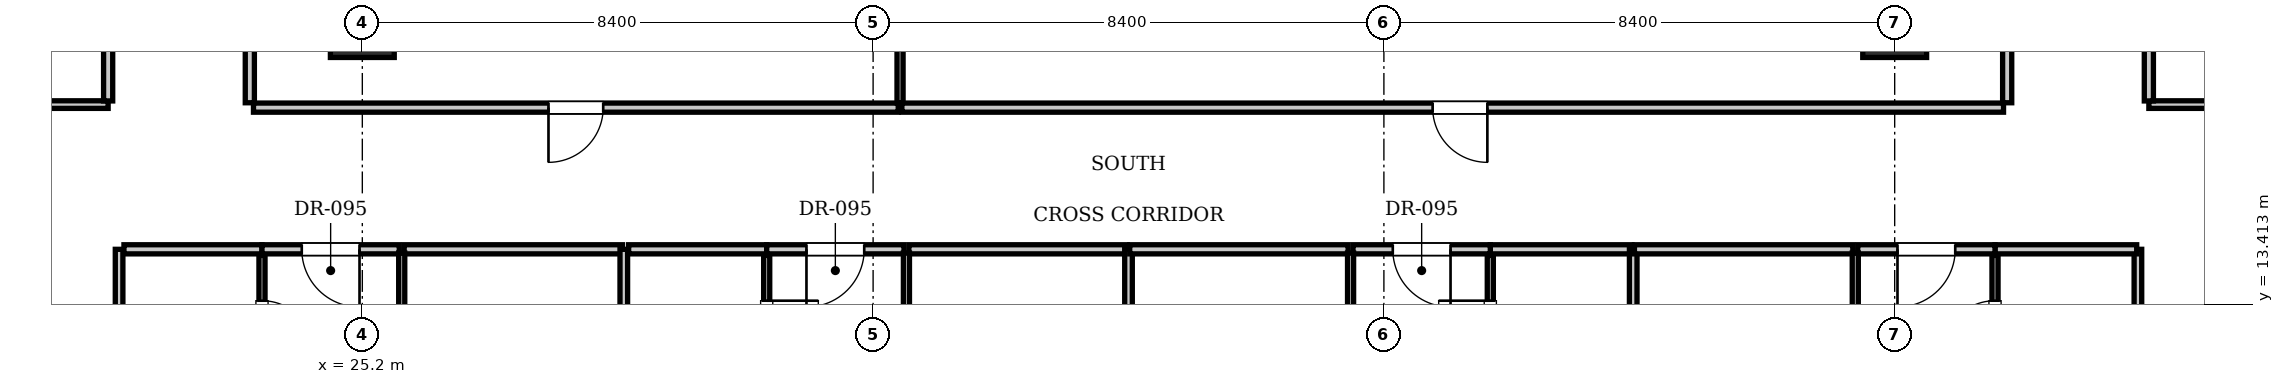
"""IFC4 building model, lengths in metres.
Left out: names, types, materials, properties, quantities, classifications, styles, units other than length and angle.
Written with IfcOpenShell. Run it as: python <this file> out.ifc"""

import sys

from ifc_helpers import new_model, si_unit, direction, frame, frame_2d, origin, origin_2d, place, context, subcontext, project, spatial, rectangle, extrude, element, fill, save


model = new_model("IFC4")
c1 = context("Model", 3, precision=1e-05, world=origin(), true_north=direction((0.0, 1.0)))
c2 = subcontext(c1, "Body", "Model", "MODEL_VIEW")
j1 = project(units=[si_unit("LENGTHUNIT", "METRE"), si_unit("PLANEANGLEUNIT", "RADIAN")], contexts=[c1])
p1 = place(None, origin())
s1 = spatial("IfcSite", under=j1, at=p1, CompositionType="ELEMENT")
p2 = place(p1, origin())
s2 = spatial("IfcBuilding", under=s1, at=p2, CompositionType="ELEMENT")
p3 = place(p2, frame((0.0, 0.0, 46.2)))
s3 = spatial("IfcBuildingStorey", under=s2, at=p3, CompositionType="ELEMENT", Elevation=46.2)
for number, where, z_axis, x_axis in (
    (1, (25.2, 18.0, 0.0), (0.0, 0.0, 1.0), (1.0, 0.0, 0.0)),
    (2, (50.4, 18.0, 0.0), (0.0, 0.0, 1.0), (1.0, 0.0, 0.0)),
):
    element("IfcColumn", number, at=place(p3, frame(where, z_axis=z_axis, x_axis=x_axis)), inside=s3, PredefinedType="COLUMN", context=c2, shape_type="SweptSolid", body=[
        extrude(rectangle(XDim=1.05, YDim=1.05, at=origin_2d()), origin(), (0.0, 0.0, 1.0), 3.85),
    ])
for number, where, z_axis, x_axis in (
    (3, (23.35, 16.73, 0.0), (0.0, 0.0, 1.0), (0.0, 1.0, 0.0)),
    (4, (52.25, 16.73, 0.0), (0.0, 0.0, 1.0), (0.0, 1.0, 0.0)),
):
    element("IfcWall", number, at=place(p3, frame(where, z_axis=z_axis, x_axis=x_axis)), inside=s3, PredefinedType="PARTITIONING", context=c2, shape_type="SweptSolid", body=[
        extrude(rectangle(XDim=7.53, YDim=0.15, at=frame_2d((3.765, 0.0))), origin(), (0.0, 0.0, 1.0), 3.61),
    ])
p4 = place(p3, frame((23.41, 16.65, 0.0), z_axis=(0.0, 0.0, 1.0), x_axis=(1.0, 0.0, 0.0)))
e5 = element("IfcWall", 5, at=p4, inside=s3, PredefinedType="PARTITIONING", context=c2, shape_type="SweptSolid", body=[
    extrude(rectangle(XDim=10.603, YDim=0.15, at=frame_2d((5.302, 0.0))), origin(), (0.0, 0.0, 1.0), 3.61),
])
p5 = place(p4, frame((4.852, 0.0, 0.0)))
e6 = element("IfcOpeningElement", 6, at=p5, cuts=e5, PredefinedType="OPENING", context=c2, shape_type="SweptSolid", body=[
    extrude(rectangle(XDim=0.9, YDim=2.1, at=frame_2d((0.45, 1.05))), frame((0.0, 0.085, 0.0), z_axis=(0.0, -1.0, 0.0), x_axis=(1.0, 0.0, 0.0)), (0.0, 0.0, 1.0), 0.17),
])
p6 = place(p3, frame((34.043, 16.73, 0.0), z_axis=(0.0, 0.0, 1.0), x_axis=(0.0, 1.0, 0.0)))
e7 = element("IfcWall", 7, at=p6, inside=s3, PredefinedType="PARTITIONING", context=c2, shape_type="SweptSolid", body=[
    extrude(rectangle(XDim=7.53, YDim=0.1, at=frame_2d((3.765, 0.0))), origin(), (0.0, 0.0, 1.0), 3.61),
])
p7 = place(p3, frame((34.073, 16.65, 0.0), z_axis=(0.0, 0.0, 1.0), x_axis=(1.0, 0.0, 0.0)))
e8 = element("IfcWall", 8, at=p7, inside=s3, PredefinedType="PARTITIONING", context=c2, shape_type="SweptSolid", body=[
    extrude(rectangle(XDim=18.117, YDim=0.15, at=frame_2d((9.059, 0.0))), origin(), (0.0, 0.0, 1.0), 3.61),
])
p8 = place(p7, frame((8.729, 0.0, 0.0)))
e9 = element("IfcOpeningElement", 9, at=p8, cuts=e8, PredefinedType="OPENING", context=c2, shape_type="SweptSolid", body=[
    extrude(rectangle(XDim=0.9, YDim=2.1, at=frame_2d((0.45, 1.05))), frame((0.0, 0.085, 0.0), z_axis=(0.0, -1.0, 0.0), x_axis=(1.0, 0.0, 0.0)), (0.0, 0.0, 1.0), 0.17),
])
for number, where, z_axis, x_axis in (
    (10, (21.2, 0.1, 0.0), (0.0, 0.0, 1.0), (0.0, 1.0, 0.0)),
    (11, (54.4, 0.1, 0.0), (0.0, 0.0, 1.0), (0.0, 1.0, 0.0)),
):
    element("IfcWall", number, at=place(p3, frame(where, z_axis=z_axis, x_axis=x_axis)), inside=s3, PredefinedType="PARTITIONING", context=c2, shape_type="SweptSolid", body=[
        extrude(rectangle(XDim=14.22, YDim=0.125, at=frame_2d((7.11, 0.0))), origin(), (0.0, 0.0, 1.0), 3.61),
    ])
p9 = place(p3, frame((21.28, 14.32, 0.0), z_axis=(0.0, 0.0, 1.0), x_axis=(1.0, 0.0, 0.0)))
e12 = element("IfcWall", 12, at=p9, inside=s3, PredefinedType="PARTITIONING", context=c2, shape_type="SweptSolid", body=[
    extrude(rectangle(XDim=2.27, YDim=0.15, at=frame_2d((1.135, 0.0))), origin(), (0.0, 0.0, 1.0), 3.61),
])
p10 = place(p3, frame((23.55, 11.88, 0.0), z_axis=(0.0, 0.0, 1.0), x_axis=(0.0, 1.0, 0.0)))
e13 = element("IfcWall", 13, at=p10, inside=s3, PredefinedType="PARTITIONING", context=c2, shape_type="SweptSolid", body=[
    extrude(rectangle(XDim=2.34, YDim=0.1, at=frame_2d((1.17, 0.0))), origin(), (0.0, 0.0, 1.0), 3.61),
])
p11 = place(p10, frame((0.745, 0.0, 0.0)))
e14 = element("IfcOpeningElement", 14, at=p11, cuts=e13, PredefinedType="OPENING", context=c2, shape_type="SweptSolid", body=[
    extrude(rectangle(XDim=0.85, YDim=2.1, at=frame_2d((0.425, 1.05))), frame((0.0, 0.06, 0.0), z_axis=(0.0, -1.0, 0.0), x_axis=(1.0, 0.0, 0.0)), (0.0, 0.0, 1.0), 0.12),
])
p12 = place(p3, frame((23.55, 14.32, 0.0), z_axis=(0.0, 0.0, 1.0), x_axis=(1.0, 0.0, 0.0)))
e15 = element("IfcWall", 15, at=p12, inside=s3, PredefinedType="PARTITIONING", context=c2, shape_type="SweptSolid", body=[
    extrude(rectangle(XDim=2.258, YDim=0.15, at=frame_2d((1.129, 0.0))), origin(), (0.0, 0.0, 1.0), 3.61),
])
p13 = place(p12, frame((0.654, 0.0, 0.0)))
e16 = element("IfcOpeningElement", 16, at=p13, cuts=e15, PredefinedType="OPENING", context=c2, shape_type="SweptSolid", body=[
    extrude(rectangle(XDim=0.95, YDim=2.15, at=frame_2d((0.475, 1.075))), frame((0.0, 0.085, 0.0), z_axis=(0.0, -1.0, 0.0), x_axis=(1.0, 0.0, 0.0)), (0.0, 0.0, 1.0), 0.17),
])
p14 = place(p3, frame((25.888, 14.32, 0.0), z_axis=(0.0, 0.0, 1.0), x_axis=(1.0, 0.0, 0.0)))
e17 = element("IfcWall", 17, at=p14, inside=s3, PredefinedType="PARTITIONING", context=c2, shape_type="SweptSolid", body=[
    extrude(rectangle(XDim=3.592, YDim=0.15, at=frame_2d((1.796, 0.0))), origin(), (0.0, 0.0, 1.0), 3.61),
])
p15 = place(p3, frame((25.848, 0.03, 0.0), z_axis=(0.0, 0.0, 1.0), x_axis=(0.0, 1.0, 0.0)))
e18 = element("IfcWall", 18, at=p15, inside=s3, PredefinedType="PARTITIONING", context=c2, shape_type="SweptSolid", body=[
    extrude(rectangle(XDim=14.23, YDim=0.1, at=frame_2d((7.115, 0.0))), origin(), (0.0, 0.0, 1.0), 3.61),
])
p16 = place(p15, frame((1.6, 0.0, 0.0)))
e19 = element("IfcOpeningElement", 19, at=p16, cuts=e18, PredefinedType="OPENING", context=c2, shape_type="SweptSolid", body=[
    extrude(rectangle(XDim=0.9, YDim=2.1, at=frame_2d((0.45, 1.05))), frame((0.0, 0.06, 0.0), z_axis=(0.0, -1.0, 0.0), x_axis=(1.0, 0.0, 0.0)), (0.0, 0.0, 1.0), 0.12),
])
p17 = place(p3, frame((29.5, 0.1, 0.0), z_axis=(0.0, 0.0, 1.0), x_axis=(0.0, 1.0, 0.0)))
e20 = element("IfcWall", 20, at=p17, inside=s3, PredefinedType="PARTITIONING", context=c2, shape_type="SweptSolid", body=[
    extrude(rectangle(XDim=14.22, YDim=0.125, at=frame_2d((7.11, 0.0))), origin(), (0.0, 0.0, 1.0), 3.255),
])
p18 = place(p3, frame((29.58, 14.32, 0.0), z_axis=(0.0, 0.0, 1.0), x_axis=(1.0, 0.0, 0.0)))
e21 = element("IfcWall", 21, at=p18, inside=s3, PredefinedType="PARTITIONING", context=c2, shape_type="SweptSolid", body=[
    extrude(rectangle(XDim=2.27, YDim=0.15, at=frame_2d((1.135, 0.0))), origin(), (0.0, 0.0, 1.0), 3.61),
])
p19 = place(p3, frame((31.85, 11.88, 0.0), z_axis=(0.0, 0.0, 1.0), x_axis=(0.0, 1.0, 0.0)))
e22 = element("IfcWall", 22, at=p19, inside=s3, PredefinedType="PARTITIONING", context=c2, shape_type="SweptSolid", body=[
    extrude(rectangle(XDim=2.34, YDim=0.1, at=frame_2d((1.17, 0.0))), origin(), (0.0, 0.0, 1.0), 3.61),
])
p20 = place(p19, frame((0.745, 0.0, 0.0)))
e23 = element("IfcOpeningElement", 23, at=p20, cuts=e22, PredefinedType="OPENING", context=c2, shape_type="SweptSolid", body=[
    extrude(rectangle(XDim=0.85, YDim=2.1, at=frame_2d((0.425, 1.05))), frame((0.0, 0.06, 0.0), z_axis=(0.0, -1.0, 0.0), x_axis=(1.0, 0.0, 0.0)), (0.0, 0.0, 1.0), 0.12),
])
p21 = place(p3, frame((31.85, 14.32, 0.0), z_axis=(0.0, 0.0, 1.0), x_axis=(1.0, 0.0, 0.0)))
e24 = element("IfcWall", 24, at=p21, inside=s3, PredefinedType="PARTITIONING", context=c2, shape_type="SweptSolid", body=[
    extrude(rectangle(XDim=2.258, YDim=0.15, at=frame_2d((1.129, 0.0))), origin(), (0.0, 0.0, 1.0), 3.61),
])
p22 = place(p21, frame((0.654, 0.0, 0.0)))
e25 = element("IfcOpeningElement", 25, at=p22, cuts=e24, PredefinedType="OPENING", context=c2, shape_type="SweptSolid", body=[
    extrude(rectangle(XDim=0.95, YDim=2.15, at=frame_2d((0.475, 1.075))), frame((0.0, 0.085, 0.0), z_axis=(0.0, -1.0, 0.0), x_axis=(1.0, 0.0, 0.0)), (0.0, 0.0, 1.0), 0.17),
])
p23 = place(p3, frame((34.188, 14.32, 0.0), z_axis=(0.0, 0.0, 1.0), x_axis=(1.0, 0.0, 0.0)))
e26 = element("IfcWall", 26, at=p23, inside=s3, PredefinedType="PARTITIONING", context=c2, shape_type="SweptSolid", body=[
    extrude(rectangle(XDim=3.592, YDim=0.15, at=frame_2d((1.796, 0.0))), origin(), (0.0, 0.0, 1.0), 3.61),
])
p24 = place(p3, frame((34.148, 0.03, 0.0), z_axis=(0.0, 0.0, 1.0), x_axis=(0.0, 1.0, 0.0)))
e27 = element("IfcWall", 27, at=p24, inside=s3, PredefinedType="PARTITIONING", context=c2, shape_type="SweptSolid", body=[
    extrude(rectangle(XDim=14.23, YDim=0.1, at=frame_2d((7.115, 0.0))), origin(), (0.0, 0.0, 1.0), 3.61),
])
p25 = place(p24, frame((1.6, 0.0, 0.0)))
e28 = element("IfcOpeningElement", 28, at=p25, cuts=e27, PredefinedType="OPENING", context=c2, shape_type="SweptSolid", body=[
    extrude(rectangle(XDim=0.9, YDim=2.1, at=frame_2d((0.45, 1.05))), frame((0.0, 0.06, 0.0), z_axis=(0.0, -1.0, 0.0), x_axis=(1.0, 0.0, 0.0)), (0.0, 0.0, 1.0), 0.12),
])
p26 = place(p3, frame((37.8, 0.1, 0.0), z_axis=(0.0, 0.0, 1.0), x_axis=(0.0, 1.0, 0.0)))
e29 = element("IfcWall", 29, at=p26, inside=s3, PredefinedType="PARTITIONING", context=c2, shape_type="SweptSolid", body=[
    extrude(rectangle(XDim=14.22, YDim=0.125, at=frame_2d((7.11, 0.0))), origin(), (0.0, 0.0, 1.0), 3.293),
])
p27 = place(p3, frame((43.75, 14.32, 0.0), z_axis=(0.0, 0.0, 1.0), x_axis=(1.0, 0.0, 0.0)))
e30 = element("IfcWall", 30, at=p27, inside=s3, PredefinedType="PARTITIONING", context=c2, shape_type="SweptSolid", body=[
    extrude(rectangle(XDim=2.33, YDim=0.15, at=frame_2d((1.165, 0.0))), origin(), (0.0, 0.0, 1.0), 3.61),
])
p28 = place(p3, frame((43.75, 11.88, 0.0), z_axis=(0.0, 0.0, 1.0), x_axis=(0.0, 1.0, 0.0)))
e31 = element("IfcWall", 31, at=p28, inside=s3, PredefinedType="PARTITIONING", context=c2, shape_type="SweptSolid", body=[
    extrude(rectangle(XDim=2.34, YDim=0.1, at=frame_2d((1.17, 0.0))), origin(), (0.0, 0.0, 1.0), 3.61),
])
p29 = place(p28, frame((0.745, 0.0, 0.0)))
e32 = element("IfcOpeningElement", 32, at=p29, cuts=e31, PredefinedType="OPENING", context=c2, shape_type="SweptSolid", body=[
    extrude(rectangle(XDim=0.85, YDim=2.1, at=frame_2d((0.425, 1.05))), frame((0.0, 0.06, 0.0), z_axis=(0.0, -1.0, 0.0), x_axis=(1.0, 0.0, 0.0)), (0.0, 0.0, 1.0), 0.12),
])
p30 = place(p3, frame((37.82, 14.32, 0.0), z_axis=(0.0, 0.0, 1.0), x_axis=(1.0, 0.0, 0.0)))
e33 = element("IfcWall", 33, at=p30, inside=s3, PredefinedType="PARTITIONING", context=c2, shape_type="SweptSolid", body=[
    extrude(rectangle(XDim=3.592, YDim=0.15, at=frame_2d((1.796, 0.0))), origin(), (0.0, 0.0, 1.0), 3.61),
])
p31 = place(p3, frame((41.492, 14.32, 0.0), z_axis=(0.0, 0.0, 1.0), x_axis=(1.0, 0.0, 0.0)))
e34 = element("IfcWall", 34, at=p31, inside=s3, PredefinedType="PARTITIONING", context=c2, shape_type="SweptSolid", body=[
    extrude(rectangle(XDim=2.258, YDim=0.15, at=frame_2d((1.129, 0.0))), origin(), (0.0, 0.0, 1.0), 3.61),
])
p32 = place(p31, frame((0.654, 0.0, 0.0)))
e35 = element("IfcOpeningElement", 35, at=p32, cuts=e34, PredefinedType="OPENING", context=c2, shape_type="SweptSolid", body=[
    extrude(rectangle(XDim=0.95, YDim=2.15, at=frame_2d((0.475, 1.075))), frame((0.0, 0.085, 0.0), z_axis=(0.0, -1.0, 0.0), x_axis=(1.0, 0.0, 0.0)), (0.0, 0.0, 1.0), 0.17),
])
p33 = place(p3, frame((41.452, 0.03, 0.0), z_axis=(0.0, 0.0, 1.0), x_axis=(0.0, 1.0, 0.0)))
e36 = element("IfcWall", 36, at=p33, inside=s3, PredefinedType="PARTITIONING", context=c2, shape_type="SweptSolid", body=[
    extrude(rectangle(XDim=14.23, YDim=0.1, at=frame_2d((7.115, 0.0))), origin(), (0.0, 0.0, 1.0), 3.61),
])
p34 = place(p33, frame((1.6, 0.0, 0.0)))
e37 = element("IfcOpeningElement", 37, at=p34, cuts=e36, PredefinedType="OPENING", context=c2, shape_type="SweptSolid", body=[
    extrude(rectangle(XDim=0.9, YDim=2.1, at=frame_2d((0.45, 1.05))), frame((0.0, 0.06, 0.0), z_axis=(0.0, -1.0, 0.0), x_axis=(1.0, 0.0, 0.0)), (0.0, 0.0, 1.0), 0.12),
])
p35 = place(p3, frame((46.1, 0.1, 0.0), z_axis=(0.0, 0.0, 1.0), x_axis=(0.0, 1.0, 0.0)))
e38 = element("IfcWall", 38, at=p35, inside=s3, PredefinedType="PARTITIONING", context=c2, shape_type="SweptSolid", body=[
    extrude(rectangle(XDim=14.22, YDim=0.125, at=frame_2d((7.11, 0.0))), origin(), (0.0, 0.0, 1.0), 3.3),
])
p36 = place(p3, frame((52.05, 14.32, 0.0), z_axis=(0.0, 0.0, 1.0), x_axis=(1.0, 0.0, 0.0)))
e39 = element("IfcWall", 39, at=p36, inside=s3, PredefinedType="PARTITIONING", context=c2, shape_type="SweptSolid", body=[
    extrude(rectangle(XDim=2.33, YDim=0.15, at=frame_2d((1.165, 0.0))), origin(), (0.0, 0.0, 1.0), 3.61),
])
p37 = place(p3, frame((52.05, 11.88, 0.0), z_axis=(0.0, 0.0, 1.0), x_axis=(0.0, 1.0, 0.0)))
e40 = element("IfcWall", 40, at=p37, inside=s3, PredefinedType="PARTITIONING", context=c2, shape_type="SweptSolid", body=[
    extrude(rectangle(XDim=2.34, YDim=0.1, at=frame_2d((1.17, 0.0))), origin(), (0.0, 0.0, 1.0), 3.61),
])
p38 = place(p37, frame((0.745, 0.0, 0.0)))
e41 = element("IfcOpeningElement", 41, at=p38, cuts=e40, PredefinedType="OPENING", context=c2, shape_type="SweptSolid", body=[
    extrude(rectangle(XDim=0.85, YDim=2.1, at=frame_2d((0.425, 1.05))), frame((0.0, 0.06, 0.0), z_axis=(0.0, -1.0, 0.0), x_axis=(1.0, 0.0, 0.0)), (0.0, 0.0, 1.0), 0.12),
])
p39 = place(p3, frame((46.12, 14.32, 0.0), z_axis=(0.0, 0.0, 1.0), x_axis=(1.0, 0.0, 0.0)))
e42 = element("IfcWall", 42, at=p39, inside=s3, PredefinedType="PARTITIONING", context=c2, shape_type="SweptSolid", body=[
    extrude(rectangle(XDim=3.592, YDim=0.15, at=frame_2d((1.796, 0.0))), origin(), (0.0, 0.0, 1.0), 3.61),
])
p40 = place(p3, frame((49.792, 14.32, 0.0), z_axis=(0.0, 0.0, 1.0), x_axis=(1.0, 0.0, 0.0)))
e43 = element("IfcWall", 43, at=p40, inside=s3, PredefinedType="PARTITIONING", context=c2, shape_type="SweptSolid", body=[
    extrude(rectangle(XDim=2.258, YDim=0.15, at=frame_2d((1.129, 0.0))), origin(), (0.0, 0.0, 1.0), 3.61),
])
p41 = place(p40, frame((0.654, 0.0, 0.0)))
e44 = element("IfcOpeningElement", 44, at=p41, cuts=e43, PredefinedType="OPENING", context=c2, shape_type="SweptSolid", body=[
    extrude(rectangle(XDim=0.95, YDim=2.15, at=frame_2d((0.475, 1.075))), frame((0.0, 0.085, 0.0), z_axis=(0.0, -1.0, 0.0), x_axis=(1.0, 0.0, 0.0)), (0.0, 0.0, 1.0), 0.17),
])
p42 = place(p3, frame((49.752, 0.03, 0.0), z_axis=(0.0, 0.0, 1.0), x_axis=(0.0, 1.0, 0.0)))
e45 = element("IfcWall", 45, at=p42, inside=s3, PredefinedType="PARTITIONING", context=c2, shape_type="SweptSolid", body=[
    extrude(rectangle(XDim=14.23, YDim=0.1, at=frame_2d((7.115, 0.0))), origin(), (0.0, 0.0, 1.0), 3.61),
])
p43 = place(p42, frame((1.6, 0.0, 0.0)))
e46 = element("IfcOpeningElement", 46, at=p43, cuts=e45, PredefinedType="OPENING", context=c2, shape_type="SweptSolid", body=[
    extrude(rectangle(XDim=0.9, YDim=2.1, at=frame_2d((0.45, 1.05))), frame((0.0, 0.06, 0.0), z_axis=(0.0, -1.0, 0.0), x_axis=(1.0, 0.0, 0.0)), (0.0, 0.0, 1.0), 0.12),
])
p44 = place(p3, frame((10.9, 16.7, 0.0), z_axis=(0.0, 0.0, 1.0), x_axis=(1.0, 0.0, 0.0)))
e47 = element("IfcWall", 47, at=p44, inside=s3, PredefinedType="PARTITIONING", context=c2, shape_type="SweptSolid", body=[
    extrude(rectangle(XDim=10.12, YDim=0.125, at=frame_2d((5.06, 0.0))), origin(), (0.0, 0.0, 1.0), 3.61),
])
p45 = place(p3, frame((54.58, 16.7, 0.0), z_axis=(0.0, 0.0, 1.0), x_axis=(1.0, 0.0, 0.0)))
e48 = element("IfcWall", 48, at=p45, inside=s3, PredefinedType="PARTITIONING", context=c2, shape_type="SweptSolid", body=[
    extrude(rectangle(XDim=10.12, YDim=0.125, at=frame_2d((5.06, 0.0))), origin(), (0.0, 0.0, 1.0), 3.61),
])
p46 = place(p3, frame((21.02, 16.76, 0.0), z_axis=(0.0, 0.0, 1.0), x_axis=(0.0, 1.0, 0.0)))
e49 = element("IfcWall", 49, at=p46, inside=s3, PredefinedType="PARTITIONING", context=c2, shape_type="SweptSolid", body=[
    extrude(rectangle(XDim=3.16, YDim=0.15, at=frame_2d((1.58, 0.0))), origin(), (0.0, 0.0, 1.0), 3.352),
])
p47 = place(p46, frame((1.105, 0.0, 0.0)))
e50 = element("IfcOpeningElement", 50, at=p47, cuts=e49, PredefinedType="OPENING", context=c2, shape_type="SweptSolid", body=[
    extrude(rectangle(XDim=0.95, YDim=2.15, at=frame_2d((0.475, 1.075))), frame((0.0, 0.085, 0.0), z_axis=(0.0, -1.0, 0.0), x_axis=(1.0, 0.0, 0.0)), (0.0, 0.0, 1.0), 0.17),
])
p48 = place(p3, frame((54.58, 16.76, 0.0), z_axis=(0.0, 0.0, 1.0), x_axis=(0.0, 1.0, 0.0)))
e51 = element("IfcWall", 51, at=p48, inside=s3, PredefinedType="PARTITIONING", context=c2, shape_type="SweptSolid", body=[
    extrude(rectangle(XDim=3.16, YDim=0.15, at=frame_2d((1.58, 0.0))), origin(), (0.0, 0.0, 1.0), 3.403),
])
p49 = place(p48, frame((1.105, 0.0, 0.0)))
e52 = element("IfcOpeningElement", 52, at=p49, cuts=e51, PredefinedType="OPENING", context=c2, shape_type="SweptSolid", body=[
    extrude(rectangle(XDim=0.95, YDim=2.15, at=frame_2d((0.475, 1.075))), frame((0.0, 0.085, 0.0), z_axis=(0.0, -1.0, 0.0), x_axis=(1.0, 0.0, 0.0)), (0.0, 0.0, 1.0), 0.17),
])
p50 = place(p5, frame((0.9, 0.0, 0.0), z_axis=(0.0, 0.0, 1.0), x_axis=(-1.0, 0.0, 0.0)))
e53 = element("IfcDoor", 53, at=p50, inside=s3, OperationType="SINGLE_SWING_RIGHT", PredefinedType="DOOR", context=c2, shape_type="SweptSolid", body=[
    extrude(rectangle(XDim=0.9, YDim=2.1, at=frame_2d((0.45, 1.05))), frame((0.0, 0.025, 0.0), z_axis=(0.0, -1.0, 0.0), x_axis=(1.0, 0.0, 0.0)), (0.0, 0.0, 1.0), 0.05),
])
fill(e6, e53)
p51 = place(p8, frame((0.9, 0.0, 0.0), z_axis=(0.0, 0.0, 1.0), x_axis=(-1.0, 0.0, 0.0)))
e54 = element("IfcDoor", 54, at=p51, inside=s3, OperationType="SINGLE_SWING_LEFT", PredefinedType="DOOR", context=c2, shape_type="SweptSolid", body=[
    extrude(rectangle(XDim=0.9, YDim=2.1, at=frame_2d((0.45, 1.05))), frame((0.0, 0.025, 0.0), z_axis=(0.0, -1.0, 0.0), x_axis=(1.0, 0.0, 0.0)), (0.0, 0.0, 1.0), 0.05),
])
fill(e9, e54)
p52 = place(p11, frame((0.85, 0.0, 0.0), z_axis=(0.0, 0.0, 1.0), x_axis=(-1.0, 0.0, 0.0)))
e55 = element("IfcDoor", 55, at=p52, inside=s3, OperationType="SINGLE_SWING_RIGHT", PredefinedType="DOOR", context=c2, shape_type="SweptSolid", body=[
    extrude(rectangle(XDim=0.85, YDim=2.1, at=frame_2d((0.425, 1.05))), frame((0.0, 0.025, 0.0), z_axis=(0.0, -1.0, 0.0), x_axis=(1.0, 0.0, 0.0)), (0.0, 0.0, 1.0), 0.05),
])
fill(e14, e55)
p53 = place(p13, frame((0.95, 0.0, 0.0), z_axis=(0.0, 0.0, 1.0), x_axis=(-1.0, 0.0, 0.0)))
e56 = element("IfcDoor", 56, at=p53, inside=s3, OperationType="SINGLE_SWING_LEFT", PredefinedType="DOOR", context=c2, shape_type="SweptSolid", body=[
    extrude(rectangle(XDim=0.95, YDim=2.15, at=frame_2d((0.475, 1.075))), frame((0.0, 0.025, 0.0), z_axis=(0.0, -1.0, 0.0), x_axis=(1.0, 0.0, 0.0)), (0.0, 0.0, 1.0), 0.05),
])
fill(e16, e56)
p54 = place(p20, frame((0.85, 0.0, 0.0), z_axis=(0.0, 0.0, 1.0), x_axis=(-1.0, 0.0, 0.0)))
e57 = element("IfcDoor", 57, at=p54, inside=s3, OperationType="SINGLE_SWING_LEFT", PredefinedType="DOOR", context=c2, shape_type="SweptSolid", body=[
    extrude(rectangle(XDim=0.85, YDim=2.1, at=frame_2d((0.425, 1.05))), frame((0.0, 0.025, 0.0), z_axis=(0.0, -1.0, 0.0), x_axis=(1.0, 0.0, 0.0)), (0.0, 0.0, 1.0), 0.05),
])
fill(e23, e57)
p55 = place(p22, frame((0.95, 0.0, 0.0), z_axis=(0.0, 0.0, 1.0), x_axis=(-1.0, 0.0, 0.0)))
e58 = element("IfcDoor", 58, at=p55, inside=s3, OperationType="SINGLE_SWING_RIGHT", PredefinedType="DOOR", context=c2, shape_type="SweptSolid", body=[
    extrude(rectangle(XDim=0.95, YDim=2.15, at=frame_2d((0.475, 1.075))), frame((0.0, 0.025, 0.0), z_axis=(0.0, -1.0, 0.0), x_axis=(1.0, 0.0, 0.0)), (0.0, 0.0, 1.0), 0.05),
])
fill(e25, e58)
p56 = place(p29, origin())
e59 = element("IfcDoor", 59, at=p56, inside=s3, OperationType="SINGLE_SWING_RIGHT", PredefinedType="DOOR", context=c2, shape_type="SweptSolid", body=[
    extrude(rectangle(XDim=0.85, YDim=2.1, at=frame_2d((0.425, 1.05))), frame((0.0, 0.025, 0.0), z_axis=(0.0, -1.0, 0.0), x_axis=(1.0, 0.0, 0.0)), (0.0, 0.0, 1.0), 0.05),
])
fill(e32, e59)
p57 = place(p32, frame((0.95, 0.0, 0.0), z_axis=(0.0, 0.0, 1.0), x_axis=(-1.0, 0.0, 0.0)))
e60 = element("IfcDoor", 60, at=p57, inside=s3, OperationType="SINGLE_SWING_LEFT", PredefinedType="DOOR", context=c2, shape_type="SweptSolid", body=[
    extrude(rectangle(XDim=0.95, YDim=2.15, at=frame_2d((0.475, 1.075))), frame((0.0, 0.025, 0.0), z_axis=(0.0, -1.0, 0.0), x_axis=(1.0, 0.0, 0.0)), (0.0, 0.0, 1.0), 0.05),
])
fill(e35, e60)
p58 = place(p38, origin())
e61 = element("IfcDoor", 61, at=p58, inside=s3, OperationType="SINGLE_SWING_LEFT", PredefinedType="DOOR", context=c2, shape_type="SweptSolid", body=[
    extrude(rectangle(XDim=0.85, YDim=2.1, at=frame_2d((0.425, 1.05))), frame((0.0, 0.025, 0.0), z_axis=(0.0, -1.0, 0.0), x_axis=(1.0, 0.0, 0.0)), (0.0, 0.0, 1.0), 0.05),
])
fill(e41, e61)
p59 = place(p41, frame((0.95, 0.0, 0.0), z_axis=(0.0, 0.0, 1.0), x_axis=(-1.0, 0.0, 0.0)))
e62 = element("IfcDoor", 62, at=p59, inside=s3, OperationType="SINGLE_SWING_RIGHT", PredefinedType="DOOR", context=c2, shape_type="SweptSolid", body=[
    extrude(rectangle(XDim=0.95, YDim=2.15, at=frame_2d((0.475, 1.075))), frame((0.0, 0.025, 0.0), z_axis=(0.0, -1.0, 0.0), x_axis=(1.0, 0.0, 0.0)), (0.0, 0.0, 1.0), 0.05),
])
fill(e44, e62)
save(model, sys.argv[1])
